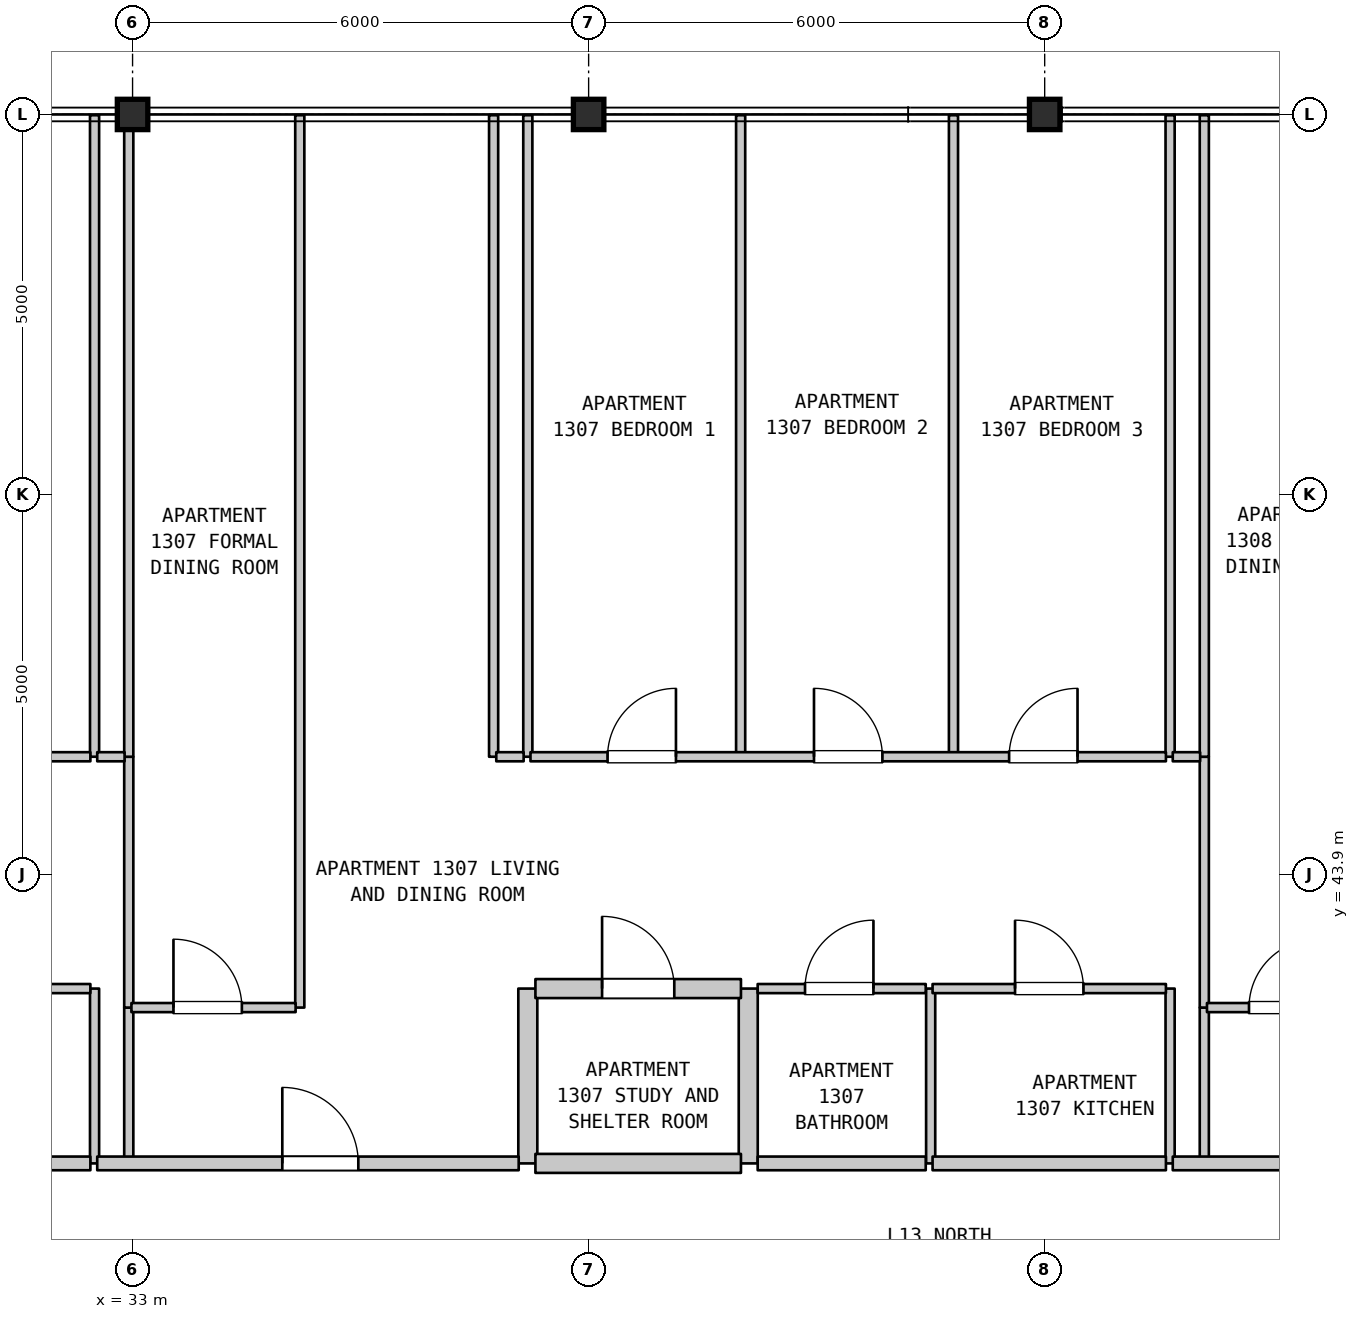
"""IFC4 building model, lengths in metres.
Left out: names, types, materials, properties, quantities, classifications, styles, units other than length and angle.
Written with IfcOpenShell. Run it as: python <this file> out.ifc"""

import sys

from ifc_helpers import new_model, si_unit, direction, frame, frame_2d, origin, origin_2d, place, context, subcontext, project, spatial, rectangle, i_section, extrude, element, fill, save


model = new_model("IFC4")
c1 = context("Model", 3, precision=1e-05, world=origin(), true_north=direction((0.0, 1.0)))
c2 = subcontext(c1, "Body", "Model", "MODEL_VIEW")
j1 = project(units=[si_unit("LENGTHUNIT", "METRE"), si_unit("PLANEANGLEUNIT", "RADIAN")], contexts=[c1])
p1 = place(None, origin())
s1 = spatial("IfcSite", under=j1, at=p1, CompositionType="ELEMENT")
p2 = place(p1, origin())
s2 = spatial("IfcBuilding", under=s1, at=p2, CompositionType="ELEMENT")
p3 = place(p2, frame((0.0, 0.0, 57.3)))
s3 = spatial("IfcBuildingStorey", under=s2, at=p3, CompositionType="ELEMENT", Elevation=57.3)
for number, where, z_axis, x_axis in (
    (1, (33.0, 53.9, 0.0), (0.0, 0.0, 1.0), (1.0, 0.0, 0.0)),
    (2, (39.0, 53.9, 0.0), (0.0, 0.0, 1.0), (1.0, 0.0, 0.0)),
    (3, (45.0, 53.9, 0.0), (0.0, 0.0, 1.0), (1.0, 0.0, 0.0)),
):
    element("IfcColumn", number, at=place(p3, frame(where, z_axis=z_axis, x_axis=x_axis)), inside=s3, PredefinedType="COLUMN", context=c2, shape_type="SweptSolid", body=[
        extrude(i_section(OverallWidth=0.401, OverallDepth=0.399, WebThickness=0.025, FlangeThickness=0.04, FilletRadius=0.015, at=origin_2d()), origin(), (0.0, 0.0, 1.0), 3.7),
    ])
p4 = place(p3, frame((32.5, 40.1, 0.0), z_axis=(0.0, 0.0, 1.0), x_axis=(0.0, 1.0, 0.0)))
e4 = element("IfcWall", 4, at=p4, inside=s3, PredefinedType="PARTITIONING", context=c2, shape_type="SweptSolid", body=[
    extrude(rectangle(XDim=2.3, YDim=0.12, at=frame_2d((1.15, 0.0))), origin(), (0.0, 0.0, 1.0), 3.28),
])
p5 = place(p3, frame((32.5, 45.45, 0.0), z_axis=(0.0, 0.0, 1.0), x_axis=(0.0, 1.0, 0.0)))
e5 = element("IfcWall", 5, at=p5, inside=s3, PredefinedType="PARTITIONING", context=c2, shape_type="SweptSolid", body=[
    extrude(rectangle(XDim=8.44, YDim=0.12, at=frame_2d((4.22, 0.0))), origin(), (0.0, 0.0, 1.0), 3.28),
])
p6 = place(p3, frame((32.95, 40.1, 0.0), z_axis=(0.0, 0.0, 1.0), x_axis=(0.0, 1.0, 0.0)))
e6 = element("IfcWall", 6, at=p6, inside=s3, PredefinedType="PARTITIONING", context=c2, shape_type="SweptSolid", body=[
    extrude(rectangle(XDim=2.05, YDim=0.12, at=frame_2d((1.025, 0.0))), origin(), (0.0, 0.0, 1.0), 2.68),
])
p7 = place(p3, frame((32.95, 42.15, 0.0), z_axis=(0.0, 0.0, 1.0), x_axis=(0.0, 1.0, 0.0)))
e7 = element("IfcWall", 7, at=p7, inside=s3, PredefinedType="PARTITIONING", context=c2, shape_type="SweptSolid", body=[
    extrude(rectangle(XDim=3.3, YDim=0.12, at=frame_2d((1.65, 0.0))), origin(), (0.0, 0.0, 1.0), 2.68),
])
p8 = place(p3, frame((32.95, 45.45, 0.0), z_axis=(0.0, 0.0, 1.0), x_axis=(0.0, 1.0, 0.0)))
e8 = element("IfcWall", 8, at=p8, inside=s3, PredefinedType="PARTITIONING", context=c2, shape_type="SweptSolid", body=[
    extrude(rectangle(XDim=8.44, YDim=0.12, at=frame_2d((4.22, 0.0))), origin(), (0.0, 0.0, 1.0), 2.68),
])
p9 = place(p3, frame((35.2, 42.15, 0.0), z_axis=(0.0, 0.0, 1.0), x_axis=(0.0, 1.0, 0.0)))
e9 = element("IfcWall", 9, at=p9, inside=s3, PredefinedType="PARTITIONING", context=c2, shape_type="SweptSolid", body=[
    extrude(rectangle(XDim=11.74, YDim=0.12, at=frame_2d((5.87, 0.0))), origin(), (0.0, 0.0, 1.0), 3.28),
])
p10 = place(p3, frame((37.75, 45.45, 0.0), z_axis=(0.0, 0.0, 1.0), x_axis=(0.0, 1.0, 0.0)))
e10 = element("IfcWall", 10, at=p10, inside=s3, PredefinedType="PARTITIONING", context=c2, shape_type="SweptSolid", body=[
    extrude(rectangle(XDim=8.44, YDim=0.12, at=frame_2d((4.22, 0.0))), origin(), (0.0, 0.0, 1.0), 3.28),
])
p11 = place(p3, frame((38.2, 40.1, 0.0), z_axis=(0.0, 0.0, 1.0), x_axis=(0.0, 1.0, 0.0)))
e11 = element("IfcWall", 11, at=p11, inside=s3, PredefinedType="STANDARD", context=c2, shape_type="SweptSolid", body=[
    extrude(rectangle(XDim=2.3, YDim=0.25, at=frame_2d((1.15, 0.0))), origin(), (0.0, 0.0, 1.0), 3.28),
])
for number, where, z_axis, x_axis in (
    (12, (38.2, 45.45, 0.0), (0.0, 0.0, 1.0), (0.0, 1.0, 0.0)),
    (13, (41.0, 45.45, 0.0), (0.0, 0.0, 1.0), (0.0, 1.0, 0.0)),
):
    element("IfcWall", number, at=place(p3, frame(where, z_axis=z_axis, x_axis=x_axis)), inside=s3, PredefinedType="PARTITIONING", context=c2, shape_type="SweptSolid", body=[
        extrude(rectangle(XDim=8.44, YDim=0.12, at=frame_2d((4.22, 0.0))), origin(), (0.0, 0.0, 1.0), 3.28),
    ])
p12 = place(p3, frame((41.1, 40.1, 0.0), z_axis=(0.0, 0.0, 1.0), x_axis=(0.0, 1.0, 0.0)))
e14 = element("IfcWall", 14, at=p12, inside=s3, PredefinedType="STANDARD", context=c2, shape_type="SweptSolid", body=[
    extrude(rectangle(XDim=2.3, YDim=0.25, at=frame_2d((1.15, 0.0))), origin(), (0.0, 0.0, 1.0), 3.28),
])
p13 = place(p3, frame((43.5, 40.1, 0.0), z_axis=(0.0, 0.0, 1.0), x_axis=(0.0, 1.0, 0.0)))
e15 = element("IfcWall", 15, at=p13, inside=s3, PredefinedType="PARTITIONING", context=c2, shape_type="SweptSolid", body=[
    extrude(rectangle(XDim=2.3, YDim=0.12, at=frame_2d((1.15, 0.0))), origin(), (0.0, 0.0, 1.0), 3.28),
])
p14 = place(p3, frame((43.8, 45.45, 0.0), z_axis=(0.0, 0.0, 1.0), x_axis=(0.0, 1.0, 0.0)))
e16 = element("IfcWall", 16, at=p14, inside=s3, PredefinedType="PARTITIONING", context=c2, shape_type="SweptSolid", body=[
    extrude(rectangle(XDim=8.44, YDim=0.12, at=frame_2d((4.22, 0.0))), origin(), (0.0, 0.0, 1.0), 3.28),
])
p15 = place(p3, frame((46.65, 40.1, 0.0), z_axis=(0.0, 0.0, 1.0), x_axis=(0.0, 1.0, 0.0)))
e17 = element("IfcWall", 17, at=p15, inside=s3, PredefinedType="PARTITIONING", context=c2, shape_type="SweptSolid", body=[
    extrude(rectangle(XDim=2.3, YDim=0.12, at=frame_2d((1.15, 0.0))), origin(), (0.0, 0.0, 1.0), 3.28),
])
p16 = place(p3, frame((46.65, 45.45, 0.0), z_axis=(0.0, 0.0, 1.0), x_axis=(0.0, 1.0, 0.0)))
e18 = element("IfcWall", 18, at=p16, inside=s3, PredefinedType="PARTITIONING", context=c2, shape_type="SweptSolid", body=[
    extrude(rectangle(XDim=8.44, YDim=0.12, at=frame_2d((4.22, 0.0))), origin(), (0.0, 0.0, 1.0), 3.28),
])
p17 = place(p3, frame((47.1, 40.1, 0.0), z_axis=(0.0, 0.0, 1.0), x_axis=(0.0, 1.0, 0.0)))
e19 = element("IfcWall", 19, at=p17, inside=s3, PredefinedType="PARTITIONING", context=c2, shape_type="SweptSolid", body=[
    extrude(rectangle(XDim=2.05, YDim=0.12, at=frame_2d((1.025, 0.0))), origin(), (0.0, 0.0, 1.0), 3.28),
])
p18 = place(p3, frame((47.1, 42.15, 0.0), z_axis=(0.0, 0.0, 1.0), x_axis=(0.0, 1.0, 0.0)))
e20 = element("IfcWall", 20, at=p18, inside=s3, PredefinedType="PARTITIONING", context=c2, shape_type="SweptSolid", body=[
    extrude(rectangle(XDim=3.3, YDim=0.12, at=frame_2d((1.65, 0.0))), origin(), (0.0, 0.0, 1.0), 3.28),
])
p19 = place(p3, frame((47.1, 45.45, 0.0), z_axis=(0.0, 0.0, 1.0), x_axis=(0.0, 1.0, 0.0)))
e21 = element("IfcWall", 21, at=p19, inside=s3, PredefinedType="PARTITIONING", context=c2, shape_type="SweptSolid", body=[
    extrude(rectangle(XDim=8.44, YDim=0.12, at=frame_2d((4.22, 0.0))), origin(), (0.0, 0.0, 1.0), 3.28),
])
p20 = place(p3, frame((28.955, 40.1, 0.0), z_axis=(0.0, 0.0, 1.0), x_axis=(1.0, 0.0, 0.0)))
e22 = element("IfcWall", 22, at=p20, inside=s3, PredefinedType="STANDARD", context=c2, shape_type="SweptSolid", body=[
    extrude(rectangle(XDim=3.49, YDim=0.18, at=frame_2d((1.745, 0.0))), origin(), (0.0, 0.0, 1.0), 3.28),
])
p21 = place(p3, frame((32.535, 40.1, 0.0), z_axis=(0.0, 0.0, 1.0), x_axis=(1.0, 0.0, 0.0)))
e23 = element("IfcWall", 23, at=p21, inside=s3, PredefinedType="STANDARD", context=c2, shape_type="SweptSolid", body=[
    extrude(rectangle(XDim=5.545, YDim=0.18, at=frame_2d((2.772, 0.0))), origin(), (0.0, 0.0, 1.0), 3.28),
])
p22 = place(p21, frame((2.435, 0.0, 0.0)))
e24 = element("IfcOpeningElement", 24, at=p22, cuts=e23, PredefinedType="OPENING", context=c2, shape_type="SweptSolid", body=[
    extrude(rectangle(XDim=1.0, YDim=2.15, at=frame_2d((0.5, 1.075))), frame((0.0, 0.1, 0.0), z_axis=(0.0, -1.0, 0.0), x_axis=(1.0, 0.0, 0.0)), (0.0, 0.0, 1.0), 0.2),
])
p23 = place(p3, frame((38.3, 40.1, 0.0), z_axis=(0.0, 0.0, 1.0), x_axis=(1.0, 0.0, 0.0)))
e25 = element("IfcWall", 25, at=p23, inside=s3, PredefinedType="STANDARD", context=c2, shape_type="SweptSolid", body=[
    extrude(rectangle(XDim=2.704, YDim=0.25, at=frame_2d((1.352, 0.0))), origin(), (0.0, 0.0, 1.0), 3.28),
])
p24 = place(p3, frame((41.224, 40.1, 0.0), z_axis=(0.0, 0.0, 1.0), x_axis=(1.0, 0.0, 0.0)))
e26 = element("IfcWall", 26, at=p24, inside=s3, PredefinedType="STANDARD", context=c2, shape_type="SweptSolid", body=[
    extrude(rectangle(XDim=2.211, YDim=0.18, at=frame_2d((1.105, 0.0))), origin(), (0.0, 0.0, 1.0), 3.28),
])
p25 = place(p3, frame((43.525, 40.1, 0.0), z_axis=(0.0, 0.0, 1.0), x_axis=(1.0, 0.0, 0.0)))
e27 = element("IfcWall", 27, at=p25, inside=s3, PredefinedType="STANDARD", context=c2, shape_type="SweptSolid", body=[
    extrude(rectangle(XDim=3.07, YDim=0.18, at=frame_2d((1.535, 0.0))), origin(), (0.0, 0.0, 1.0), 3.28),
])
p26 = place(p3, frame((46.685, 40.1, 0.0), z_axis=(0.0, 0.0, 1.0), x_axis=(1.0, 0.0, 0.0)))
e28 = element("IfcWall", 28, at=p26, inside=s3, PredefinedType="STANDARD", context=c2, shape_type="SweptSolid", body=[
    extrude(rectangle(XDim=5.61, YDim=0.18, at=frame_2d((2.805, 0.0))), origin(), (0.0, 0.0, 1.0), 3.28),
])
p27 = place(p26, frame((2.435, 0.0, 0.0)))
e29 = element("IfcOpeningElement", 29, at=p27, cuts=e28, PredefinedType="OPENING", context=c2, shape_type="SweptSolid", body=[
    extrude(rectangle(XDim=1.0, YDim=2.15, at=frame_2d((0.5, 1.075))), frame((0.0, 0.1, 0.0), z_axis=(0.0, -1.0, 0.0), x_axis=(1.0, 0.0, 0.0)), (0.0, 0.0, 1.0), 0.2),
])
p28 = place(p3, frame((32.985, 42.15, 0.0), z_axis=(0.0, 0.0, 1.0), x_axis=(1.0, 0.0, 0.0)))
e30 = element("IfcWall", 30, at=p28, inside=s3, PredefinedType="PARTITIONING", context=c2, shape_type="SweptSolid", body=[
    extrude(rectangle(XDim=2.16, YDim=0.12, at=frame_2d((1.08, 0.0))), origin(), (0.0, 0.0, 1.0), 3.28),
])
p29 = place(p28, frame((0.553, 0.0, 0.0)))
e31 = element("IfcOpeningElement", 31, at=p29, cuts=e30, PredefinedType="OPENING", context=c2, shape_type="SweptSolid", body=[
    extrude(rectangle(XDim=0.9, YDim=2.15, at=frame_2d((0.45, 1.075))), frame((0.0, 0.07, 0.0), z_axis=(0.0, -1.0, 0.0), x_axis=(1.0, 0.0, 0.0)), (0.0, 0.0, 1.0), 0.14),
])
p30 = place(p3, frame((47.135, 42.15, 0.0), z_axis=(0.0, 0.0, 1.0), x_axis=(1.0, 0.0, 0.0)))
e32 = element("IfcWall", 32, at=p30, inside=s3, PredefinedType="PARTITIONING", context=c2, shape_type="SweptSolid", body=[
    extrude(rectangle(XDim=2.16, YDim=0.12, at=frame_2d((1.08, 0.0))), origin(), (0.0, 0.0, 1.0), 3.28),
])
p31 = place(p30, frame((0.553, 0.0, 0.0)))
e33 = element("IfcOpeningElement", 33, at=p31, cuts=e32, PredefinedType="OPENING", context=c2, shape_type="SweptSolid", body=[
    extrude(rectangle(XDim=0.9, YDim=2.15, at=frame_2d((0.45, 1.075))), frame((0.0, 0.07, 0.0), z_axis=(0.0, -1.0, 0.0), x_axis=(1.0, 0.0, 0.0)), (0.0, 0.0, 1.0), 0.14),
])
p32 = place(p3, frame((28.955, 42.4, 0.0), z_axis=(0.0, 0.0, 1.0), x_axis=(1.0, 0.0, 0.0)))
e34 = element("IfcWall", 34, at=p32, inside=s3, PredefinedType="PARTITIONING", context=c2, shape_type="SweptSolid", body=[
    extrude(rectangle(XDim=3.49, YDim=0.12, at=frame_2d((1.745, 0.0))), origin(), (0.0, 0.0, 1.0), 3.28),
])
p33 = place(p32, frame((1.223, 0.0, 0.0)))
e35 = element("IfcOpeningElement", 35, at=p33, cuts=e34, PredefinedType="OPENING", context=c2, shape_type="SweptSolid", body=[
    extrude(rectangle(XDim=0.9, YDim=2.1, at=frame_2d((0.45, 1.05))), frame((0.0, 0.07, 0.0), z_axis=(0.0, -1.0, 0.0), x_axis=(1.0, 0.0, 0.0)), (0.0, 0.0, 1.0), 0.14),
])
p34 = place(p3, frame((38.3, 42.4, 0.0), z_axis=(0.0, 0.0, 1.0), x_axis=(1.0, 0.0, 0.0)))
e36 = element("IfcWall", 36, at=p34, inside=s3, PredefinedType="STANDARD", context=c2, shape_type="SweptSolid", body=[
    extrude(rectangle(XDim=2.704, YDim=0.25, at=frame_2d((1.352, 0.0))), origin(), (0.0, 0.0, 1.0), 3.28),
])
p35 = place(p34, frame((0.877, 0.0, 0.0)))
e37 = element("IfcOpeningElement", 37, at=p35, cuts=e36, PredefinedType="OPENING", context=c2, shape_type="SweptSolid", body=[
    extrude(rectangle(XDim=0.95, YDim=2.15, at=frame_2d((0.475, 1.075))), frame((0.0, 0.135, 0.0), z_axis=(0.0, -1.0, 0.0), x_axis=(1.0, 0.0, 0.0)), (0.0, 0.0, 1.0), 0.27),
])
p36 = place(p3, frame((41.224, 42.4, 0.0), z_axis=(0.0, 0.0, 1.0), x_axis=(1.0, 0.0, 0.0)))
e38 = element("IfcWall", 38, at=p36, inside=s3, PredefinedType="PARTITIONING", context=c2, shape_type="SweptSolid", body=[
    extrude(rectangle(XDim=2.211, YDim=0.12, at=frame_2d((1.105, 0.0))), origin(), (0.0, 0.0, 1.0), 3.28),
])
p37 = place(p36, frame((0.623, 0.0, 0.0)))
e39 = element("IfcOpeningElement", 39, at=p37, cuts=e38, PredefinedType="OPENING", context=c2, shape_type="SweptSolid", body=[
    extrude(rectangle(XDim=0.9, YDim=2.1, at=frame_2d((0.45, 1.05))), frame((0.0, 0.07, 0.0), z_axis=(0.0, -1.0, 0.0), x_axis=(1.0, 0.0, 0.0)), (0.0, 0.0, 1.0), 0.14),
])
p38 = place(p3, frame((43.525, 42.4, 0.0), z_axis=(0.0, 0.0, 1.0), x_axis=(1.0, 0.0, 0.0)))
e40 = element("IfcWall", 40, at=p38, inside=s3, PredefinedType="PARTITIONING", context=c2, shape_type="SweptSolid", body=[
    extrude(rectangle(XDim=3.07, YDim=0.12, at=frame_2d((1.535, 0.0))), origin(), (0.0, 0.0, 1.0), 3.28),
])
p39 = place(p38, frame((1.085, 0.0, 0.0)))
e41 = element("IfcOpeningElement", 41, at=p39, cuts=e40, PredefinedType="OPENING", context=c2, shape_type="SweptSolid", body=[
    extrude(rectangle(XDim=0.9, YDim=2.15, at=frame_2d((0.45, 1.075))), frame((0.0, 0.07, 0.0), z_axis=(0.0, -1.0, 0.0), x_axis=(1.0, 0.0, 0.0)), (0.0, 0.0, 1.0), 0.14),
])
p40 = place(p3, frame((25.905, 45.45, 0.0), z_axis=(0.0, 0.0, 1.0), x_axis=(1.0, 0.0, 0.0)))
e42 = element("IfcWall", 42, at=p40, inside=s3, PredefinedType="PARTITIONING", context=c2, shape_type="SweptSolid", body=[
    extrude(rectangle(XDim=6.54, YDim=0.12, at=frame_2d((3.27, 0.0))), origin(), (0.0, 0.0, 1.0), 3.28),
])
p41 = place(p40, frame((1.266, 0.0, 0.0)))
e43 = element("IfcOpeningElement", 43, at=p41, cuts=e42, PredefinedType="OPENING", context=c2, shape_type="SweptSolid", body=[
    extrude(rectangle(XDim=0.9, YDim=2.15, at=frame_2d((0.45, 1.075))), frame((0.0, 0.07, 0.0), z_axis=(0.0, -1.0, 0.0), x_axis=(1.0, 0.0, 0.0)), (0.0, 0.0, 1.0), 0.14),
])
p42 = place(p40, frame((4.231, 0.0, 0.0)))
e44 = element("IfcOpeningElement", 44, at=p42, cuts=e42, PredefinedType="OPENING", context=c2, shape_type="SweptSolid", body=[
    extrude(rectangle(XDim=0.9, YDim=2.15, at=frame_2d((0.45, 1.075))), frame((0.0, 0.07, 0.0), z_axis=(0.0, -1.0, 0.0), x_axis=(1.0, 0.0, 0.0)), (0.0, 0.0, 1.0), 0.14),
])
for number, where, z_axis, x_axis in (
    (45, (32.535, 45.45, 0.0), (0.0, 0.0, 1.0), (1.0, 0.0, 0.0)),
    (46, (37.785, 45.45, 0.0), (0.0, 0.0, 1.0), (1.0, 0.0, 0.0)),
):
    element("IfcWall", number, at=place(p3, frame(where, z_axis=z_axis, x_axis=x_axis)), inside=s3, PredefinedType="PARTITIONING", context=c2, shape_type="SweptSolid", body=[
        extrude(rectangle(XDim=0.36, YDim=0.12, at=frame_2d((0.18, 0.0))), origin(), (0.0, 0.0, 1.0), 3.28),
    ])
p43 = place(p3, frame((38.235, 45.45, 0.0), z_axis=(0.0, 0.0, 1.0), x_axis=(1.0, 0.0, 0.0)))
e47 = element("IfcWall", 47, at=p43, inside=s3, PredefinedType="PARTITIONING", context=c2, shape_type="SweptSolid", body=[
    extrude(rectangle(XDim=8.36, YDim=0.12, at=frame_2d((4.18, 0.0))), origin(), (0.0, 0.0, 1.0), 3.28),
])
p44 = place(p43, frame((1.014, 0.0, 0.0)))
e48 = element("IfcOpeningElement", 48, at=p44, cuts=e47, PredefinedType="OPENING", context=c2, shape_type="SweptSolid", body=[
    extrude(rectangle(XDim=0.9, YDim=2.15, at=frame_2d((0.45, 1.075))), frame((0.0, 0.07, 0.0), z_axis=(0.0, -1.0, 0.0), x_axis=(1.0, 0.0, 0.0)), (0.0, 0.0, 1.0), 0.14),
])
p45 = place(p43, frame((3.73, 0.0, 0.0)))
e49 = element("IfcOpeningElement", 49, at=p45, cuts=e47, PredefinedType="OPENING", context=c2, shape_type="SweptSolid", body=[
    extrude(rectangle(XDim=0.9, YDim=2.15, at=frame_2d((0.45, 1.075))), frame((0.0, 0.07, 0.0), z_axis=(0.0, -1.0, 0.0), x_axis=(1.0, 0.0, 0.0)), (0.0, 0.0, 1.0), 0.14),
])
p46 = place(p43, frame((6.297, 0.0, 0.0)))
e50 = element("IfcOpeningElement", 50, at=p46, cuts=e47, PredefinedType="OPENING", context=c2, shape_type="SweptSolid", body=[
    extrude(rectangle(XDim=0.9, YDim=2.15, at=frame_2d((0.45, 1.075))), frame((0.0, 0.07, 0.0), z_axis=(0.0, -1.0, 0.0), x_axis=(1.0, 0.0, 0.0)), (0.0, 0.0, 1.0), 0.14),
])
p47 = place(p3, frame((46.685, 45.45, 0.0), z_axis=(0.0, 0.0, 1.0), x_axis=(1.0, 0.0, 0.0)))
e51 = element("IfcWall", 51, at=p47, inside=s3, PredefinedType="PARTITIONING", context=c2, shape_type="SweptSolid", body=[
    extrude(rectangle(XDim=0.36, YDim=0.12, at=frame_2d((0.18, 0.0))), origin(), (0.0, 0.0, 1.0), 3.28),
])
p48 = place(p22, origin())
e52 = element("IfcDoor", 52, at=p48, inside=s3, OperationType="SINGLE_SWING_LEFT", PredefinedType="DOOR", context=c2, shape_type="SweptSolid", body=[
    extrude(rectangle(XDim=1.0, YDim=2.15, at=frame_2d((0.5, 1.075))), frame((0.0, 0.025, 0.0), z_axis=(0.0, -1.0, 0.0), x_axis=(1.0, 0.0, 0.0)), (0.0, 0.0, 1.0), 0.05),
])
fill(e24, e52)
p49 = place(p29, origin())
e53 = element("IfcDoor", 53, at=p49, inside=s3, OperationType="SINGLE_SWING_LEFT", PredefinedType="DOOR", context=c2, shape_type="SweptSolid", body=[
    extrude(rectangle(XDim=0.9, YDim=2.15, at=frame_2d((0.45, 1.075))), frame((0.0, 0.025, 0.0), z_axis=(0.0, -1.0, 0.0), x_axis=(1.0, 0.0, 0.0)), (0.0, 0.0, 1.0), 0.05),
])
fill(e31, e53)
p50 = place(p31, origin())
e54 = element("IfcDoor", 54, at=p50, inside=s3, OperationType="SINGLE_SWING_RIGHT", PredefinedType="DOOR", context=c2, shape_type="SweptSolid", body=[
    extrude(rectangle(XDim=0.9, YDim=2.15, at=frame_2d((0.45, 1.075))), frame((0.0, 0.025, 0.0), z_axis=(0.0, -1.0, 0.0), x_axis=(1.0, 0.0, 0.0)), (0.0, 0.0, 1.0), 0.05),
])
fill(e33, e54)
p51 = place(p35, origin())
e55 = element("IfcDoor", 55, at=p51, inside=s3, OperationType="SINGLE_SWING_LEFT", PredefinedType="DOOR", context=c2, shape_type="SweptSolid", body=[
    extrude(rectangle(XDim=0.95, YDim=2.15, at=frame_2d((0.475, 1.075))), frame((0.0, 0.025, 0.0), z_axis=(0.0, -1.0, 0.0), x_axis=(1.0, 0.0, 0.0)), (0.0, 0.0, 1.0), 0.05),
])
fill(e37, e55)
p52 = place(p37, origin())
e56 = element("IfcDoor", 56, at=p52, inside=s3, OperationType="SINGLE_SWING_RIGHT", PredefinedType="DOOR", context=c2, shape_type="SweptSolid", body=[
    extrude(rectangle(XDim=0.9, YDim=2.1, at=frame_2d((0.45, 1.05))), frame((0.0, 0.025, 0.0), z_axis=(0.0, -1.0, 0.0), x_axis=(1.0, 0.0, 0.0)), (0.0, 0.0, 1.0), 0.05),
])
fill(e39, e56)
p53 = place(p39, origin())
e57 = element("IfcDoor", 57, at=p53, inside=s3, OperationType="SINGLE_SWING_LEFT", PredefinedType="DOOR", context=c2, shape_type="SweptSolid", body=[
    extrude(rectangle(XDim=0.9, YDim=2.15, at=frame_2d((0.45, 1.075))), frame((0.0, 0.025, 0.0), z_axis=(0.0, -1.0, 0.0), x_axis=(1.0, 0.0, 0.0)), (0.0, 0.0, 1.0), 0.05),
])
fill(e41, e57)
p54 = place(p44, origin())
e58 = element("IfcDoor", 58, at=p54, inside=s3, OperationType="SINGLE_SWING_RIGHT", PredefinedType="DOOR", context=c2, shape_type="SweptSolid", body=[
    extrude(rectangle(XDim=0.9, YDim=2.15, at=frame_2d((0.45, 1.075))), frame((0.0, 0.025, 0.0), z_axis=(0.0, -1.0, 0.0), x_axis=(1.0, 0.0, 0.0)), (0.0, 0.0, 1.0), 0.05),
])
fill(e48, e58)
p55 = place(p45, origin())
e59 = element("IfcDoor", 59, at=p55, inside=s3, OperationType="SINGLE_SWING_LEFT", PredefinedType="DOOR", context=c2, shape_type="SweptSolid", body=[
    extrude(rectangle(XDim=0.9, YDim=2.15, at=frame_2d((0.45, 1.075))), frame((0.0, 0.025, 0.0), z_axis=(0.0, -1.0, 0.0), x_axis=(1.0, 0.0, 0.0)), (0.0, 0.0, 1.0), 0.05),
])
fill(e49, e59)
p56 = place(p46, origin())
e60 = element("IfcDoor", 60, at=p56, inside=s3, OperationType="SINGLE_SWING_RIGHT", PredefinedType="DOOR", context=c2, shape_type="SweptSolid", body=[
    extrude(rectangle(XDim=0.9, YDim=2.15, at=frame_2d((0.45, 1.075))), frame((0.0, 0.025, 0.0), z_axis=(0.0, -1.0, 0.0), x_axis=(1.0, 0.0, 0.0)), (0.0, 0.0, 1.0), 0.05),
])
fill(e50, e60)
save(model, sys.argv[1])
